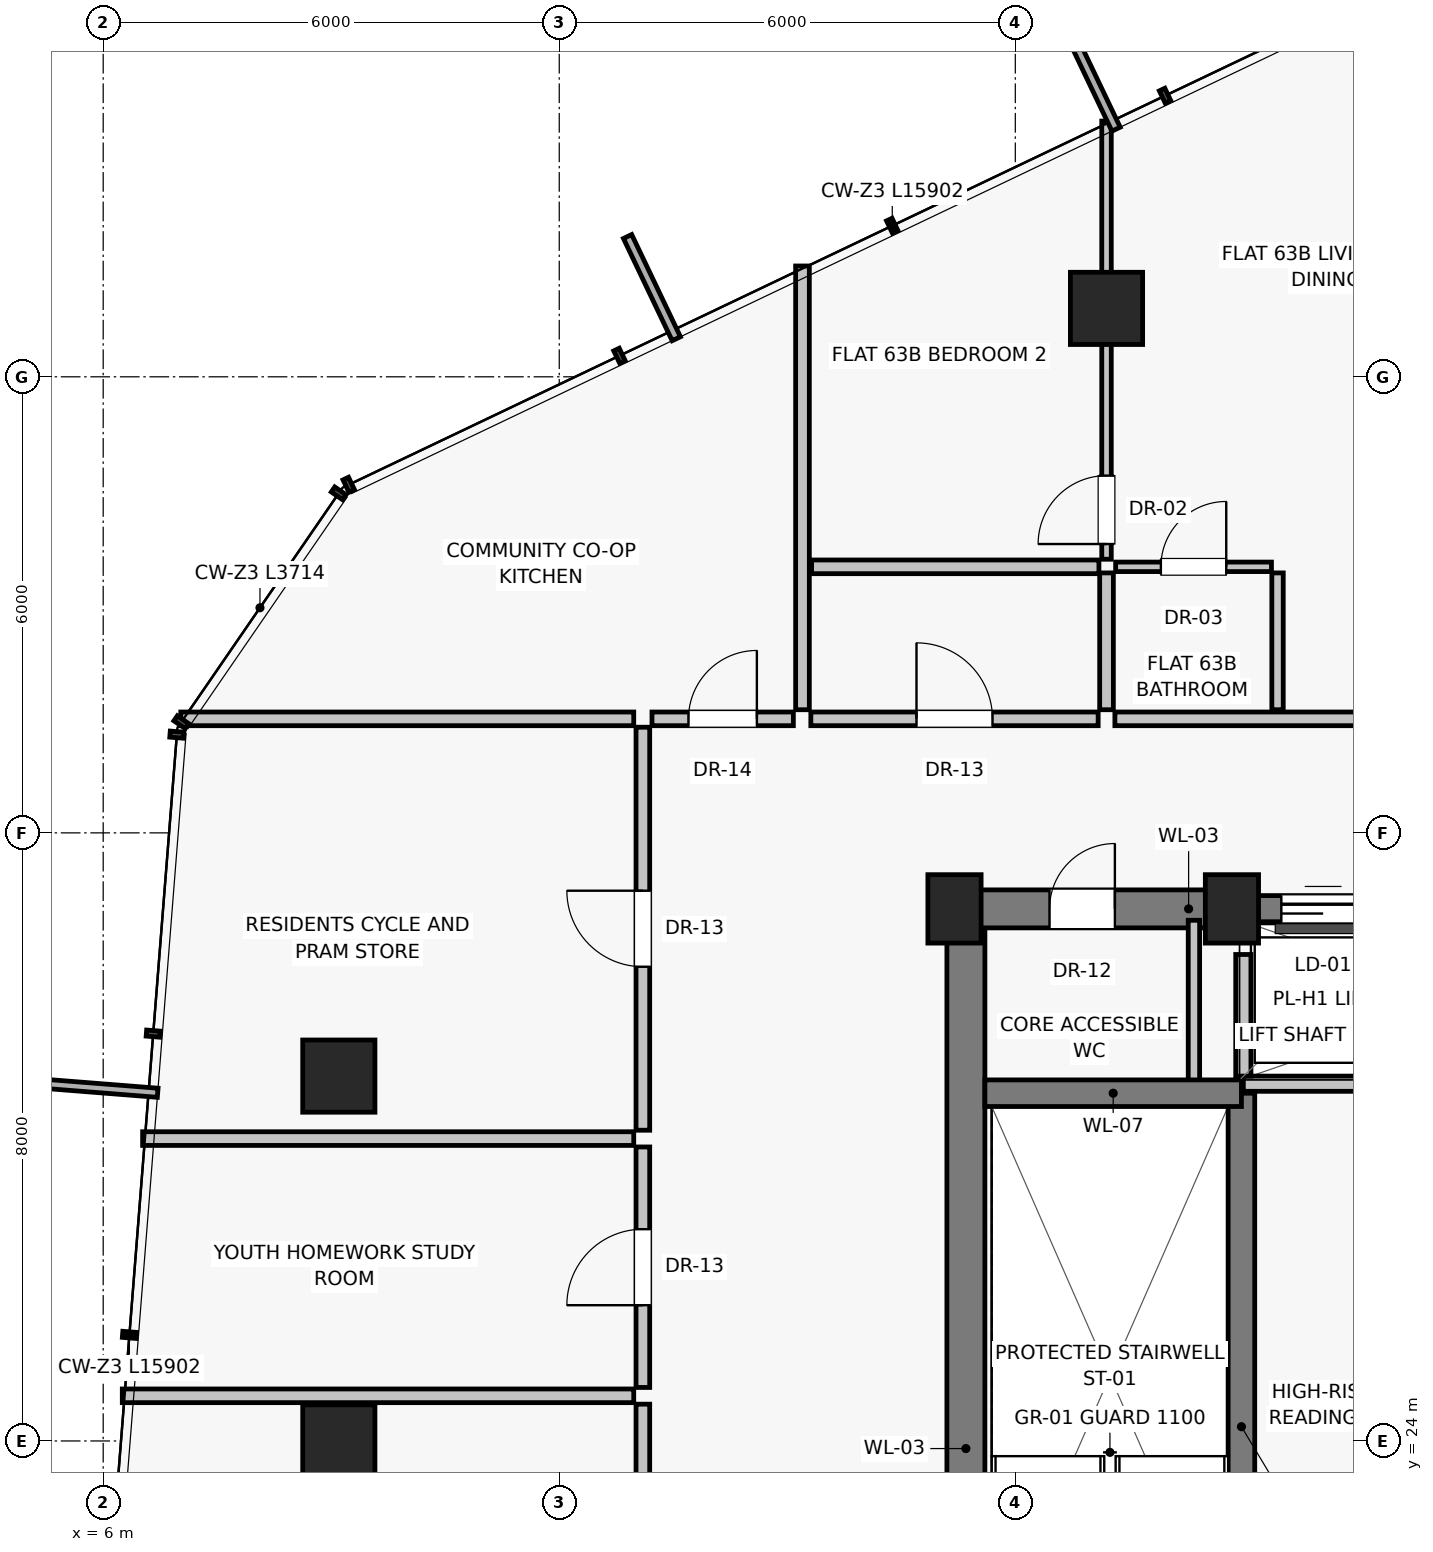
"""IFC4 building model, lengths in metres.
Left out: names, types, materials, properties, quantities, classifications, styles, units other than length and angle.
Written with IfcOpenShell. Run it as: python <this file> out.ifc"""

import sys

from ifc_helpers import new_model, si_unit, direction, frame, frame_2d, origin, origin_2d, place, context, subcontext, project, spatial, rectangle, extrude, source, transform, mapped, element, fill, save


model = new_model("IFC4")
c1 = context("Model", 3, precision=1e-05, world=origin(), true_north=direction((0.0, 1.0)))
c2 = subcontext(c1, "Body", "Model", "MODEL_VIEW")
j1 = project(units=[si_unit("LENGTHUNIT", "METRE"), si_unit("PLANEANGLEUNIT", "RADIAN")], contexts=[c1])
p1 = place(None, origin())
s1 = spatial("IfcSite", under=j1, at=p1, CompositionType="ELEMENT")
p2 = place(p1, origin())
s2 = spatial("IfcBuilding", under=s1, at=p2, CompositionType="ELEMENT")
p3 = place(p2, frame((0.0, 0.0, 222.15)))
s3 = spatial("IfcBuildingStorey", under=s2, at=p3, CompositionType="ELEMENT", Elevation=222.15)
for number, where, z_axis, x_axis in (
    (1, (17.2, 31.0, 0.0), (0.0, 0.0, 1.0), (1.0, 0.0, 0.0)),
    (2, (20.85, 31.0, 0.0), (0.0, 0.0, 1.0), (1.0, 0.0, 0.0)),
):
    element("IfcColumn", number, at=place(p3, frame(where, z_axis=z_axis, x_axis=x_axis)), inside=s3, PredefinedType="PILASTER", context=c2, shape_type="SweptSolid", body=[
        extrude(rectangle(XDim=0.7, YDim=0.9, at=origin_2d()), origin(), (0.0, 0.0, 1.0), 3.25),
    ])
for number, where, z_axis, x_axis in (
    (3, (19.2, 38.9, 0.0), (0.0, 0.0, 1.0), (1.0, 0.0, 0.0)),
    (4, (9.1, 28.8, 0.0), (0.0, 0.0, 1.0), (1.0, 0.0, 0.0)),
    (5, (9.1, 24.0, 0.0), (0.0, 0.0, 1.0), (1.0, 0.0, 0.0)),
):
    element("IfcColumn", number, at=place(p3, frame(where, z_axis=z_axis, x_axis=x_axis)), inside=s3, PredefinedType="COLUMN", context=c2, shape_type="SweptSolid", body=[
        extrude(rectangle(XDim=0.95, YDim=0.95, at=origin_2d()), origin(), (0.0, 0.0, 1.0), 3.25),
    ])
p4 = place(p3, frame((17.35, 16.8, 0.0), z_axis=(0.0, 0.0, 1.0), x_axis=(0.0, 1.0, 0.0)))
e6 = element("IfcWall", 6, at=p4, inside=s3, PredefinedType="SHEAR", context=c2, shape_type="SweptSolid", body=[
    extrude(rectangle(XDim=14.2, YDim=0.5, at=frame_2d((7.1, 0.0))), origin(), (0.0, 0.0, 1.0), 2.93),
])
p5 = place(p3, frame((17.2, 31.0, 0.0), z_axis=(0.0, 0.0, 1.0), x_axis=(1.0, 0.0, 0.0)))
e7 = element("IfcWall", 7, at=p5, inside=s3, PredefinedType="SHEAR", context=c2, shape_type="SweptSolid", body=[
    extrude(rectangle(XDim=3.8, YDim=0.5, at=frame_2d((1.9, 0.0))), origin(), (0.0, 0.0, 1.0), 2.93),
])
p6 = place(p5, frame((1.25, 0.0, 0.0)))
e8 = element("IfcOpeningElement", 8, at=p6, cuts=e7, PredefinedType="OPENING", context=c2, shape_type="SweptSolid", body=[
    extrude(rectangle(XDim=0.86, YDim=2.01, at=frame_2d((0.43, 1.005))), frame((0.0, 0.26, 0.0), z_axis=(0.0, -1.0, 0.0), x_axis=(1.0, 0.0, 0.0)), (0.0, 0.0, 1.0), 0.52),
])
p7 = place(p3, frame((21.0, 31.0, 0.0), z_axis=(0.0, 0.0, 1.0), x_axis=(1.0, 0.0, 0.0)))
e9 = element("IfcWall", 9, at=p7, inside=s3, PredefinedType="SHEAR", context=c2, shape_type="SweptSolid", body=[
    extrude(rectangle(XDim=6.0, YDim=0.35, at=frame_2d((3.0, 0.0))), origin(), (0.0, 0.0, 1.0), 2.93),
])
p8 = place(p7, frame((0.5, 0.0, 0.0)))
e10 = element("IfcOpeningElement", 10, at=p8, cuts=e9, PredefinedType="OPENING", context=c2, shape_type="SweptSolid", body=[
    extrude(rectangle(XDim=1.1, YDim=2.08, at=frame_2d((0.55, 1.04))), frame((0.0, 0.185, 0.0), z_axis=(0.0, -1.0, 0.0), x_axis=(1.0, 0.0, 0.0)), (0.0, 0.0, 1.0), 0.37),
])
p9 = place(p7, frame((2.45, 0.0, 0.0)))
e11 = element("IfcOpeningElement", 11, at=p9, cuts=e9, PredefinedType="OPENING", context=c2, shape_type="SweptSolid", body=[
    extrude(rectangle(XDim=1.1, YDim=2.08, at=frame_2d((0.55, 1.04))), frame((0.0, 0.185, 0.0), z_axis=(0.0, -1.0, 0.0), x_axis=(1.0, 0.0, 0.0)), (0.0, 0.0, 1.0), 0.37),
])
p10 = place(p7, frame((4.4, 0.0, 0.0)))
e12 = element("IfcOpeningElement", 12, at=p10, cuts=e9, PredefinedType="OPENING", context=c2, shape_type="SweptSolid", body=[
    extrude(rectangle(XDim=1.1, YDim=2.08, at=frame_2d((0.55, 1.04))), frame((0.0, 0.185, 0.0), z_axis=(0.0, -1.0, 0.0), x_axis=(1.0, 0.0, 0.0)), (0.0, 0.0, 1.0), 0.37),
])
p11 = place(p3, frame((20.35, 28.65, 0.0), z_axis=(0.0, 0.0, 1.0), x_axis=(0.0, 1.0, 0.0)))
e13 = element("IfcWall", 13, at=p11, inside=s3, PredefinedType="PARTITIONING", context=c2, shape_type="SweptSolid", body=[
    extrude(rectangle(XDim=2.2, YDim=0.15, at=frame_2d((1.1, 0.0))), origin(), (0.0, 0.0, 1.0), 2.93),
])
p12 = place(p3, frame((20.975, 19.8, 0.0), z_axis=(0.0, 0.0, 1.0), x_axis=(0.0, 1.0, 0.0)))
e14 = element("IfcWall", 14, at=p12, inside=s3, PredefinedType="SHEAR", context=c2, shape_type="SweptSolid", body=[
    extrude(rectangle(XDim=8.775, YDim=0.35, at=frame_2d((4.387, 0.0))), origin(), (0.0, 0.0, 1.0), 2.93),
])
p13 = place(p3, frame((17.6, 28.575, 0.0), z_axis=(0.0, 0.0, 1.0), x_axis=(1.0, 0.0, 0.0)))
e15 = element("IfcWall", 15, at=p13, inside=s3, PredefinedType="SHEAR", context=c2, shape_type="SweptSolid", body=[
    extrude(rectangle(XDim=3.375, YDim=0.35, at=frame_2d((1.688, 0.0))), origin(), (0.0, 0.0, 1.0), 2.93),
])
p14 = place(p3, frame((21.0, 28.7, 0.0), z_axis=(0.0, 0.0, 1.0), x_axis=(1.0, 0.0, 0.0)))
e16 = element("IfcWall", 16, at=p14, inside=s3, PredefinedType="SOLIDWALL", context=c2, shape_type="SweptSolid", body=[
    extrude(rectangle(XDim=6.0, YDim=0.2, at=frame_2d((3.0, 0.0))), origin(), (0.0, 0.0, 1.0), 2.93),
])
p15 = place(p3, frame((21.0, 28.8, 0.0), z_axis=(0.0, 0.0, 1.0), x_axis=(0.0, 1.0, 0.0)))
e17 = element("IfcWall", 17, at=p15, inside=s3, PredefinedType="SOLIDWALL", context=c2, shape_type="SweptSolid", body=[
    extrude(rectangle(XDim=1.6, YDim=0.2, at=frame_2d((0.8, 0.0))), origin(), (0.0, 0.0, 1.0), 2.93),
])
p16 = place(p3, frame((15.2, 33.62, 0.0), z_axis=(0.0, 0.0, 1.0), x_axis=(0.0, 1.0, 0.0)))
e18 = element("IfcWall", 18, at=p16, inside=s3, PredefinedType="PARTITIONING", context=c2, shape_type="SweptSolid", body=[
    extrude(rectangle(XDim=5.838, YDim=0.18, at=frame_2d((2.919, 0.0))), origin(), (0.0, 0.0, 1.0), 2.93),
])
p17 = place(p3, frame((15.31, 33.5, 0.0), z_axis=(0.0, 0.0, 1.0), x_axis=(1.0, 0.0, 0.0)))
e19 = element("IfcWall", 19, at=p17, inside=s3, PredefinedType="PARTITIONING", context=c2, shape_type="SweptSolid", body=[
    extrude(rectangle(XDim=3.78, YDim=0.18, at=frame_2d((1.89, 0.0))), origin(), (0.0, 0.0, 1.0), 2.93),
])
p18 = place(p17, frame((1.39, 0.0, 0.0)))
e20 = element("IfcOpeningElement", 20, at=p18, cuts=e19, PredefinedType="OPENING", context=c2, shape_type="SweptSolid", body=[
    extrude(rectangle(XDim=1.0, YDim=2.01, at=frame_2d((0.5, 1.005))), frame((0.0, 0.1, 0.0), z_axis=(0.0, -1.0, 0.0), x_axis=(1.0, 0.0, 0.0)), (0.0, 0.0, 1.0), 0.2),
])
p19 = place(p3, frame((19.31, 33.5, 0.0), z_axis=(0.0, 0.0, 1.0), x_axis=(1.0, 0.0, 0.0)))
e21 = element("IfcWall", 21, at=p19, inside=s3, PredefinedType="PARTITIONING", context=c2, shape_type="SweptSolid", body=[
    extrude(rectangle(XDim=11.78, YDim=0.18, at=frame_2d((5.89, 0.0))), origin(), (0.0, 0.0, 1.0), 2.93),
])
p20 = place(p19, frame((3.98, 0.0, 0.0)))
e22 = element("IfcOpeningElement", 22, at=p20, cuts=e21, PredefinedType="OPENING", context=c2, shape_type="SweptSolid", body=[
    extrude(rectangle(XDim=0.95, YDim=2.02, at=frame_2d((0.475, 1.01))), frame((0.0, 0.1, 0.0), z_axis=(0.0, -1.0, 0.0), x_axis=(1.0, 0.0, 0.0)), (0.0, 0.0, 1.0), 0.2),
])
p21 = place(p3, frame((15.32, 35.5, 0.0), z_axis=(0.0, 0.0, 1.0), x_axis=(1.0, 0.0, 0.0)))
e23 = element("IfcWall", 23, at=p21, inside=s3, PredefinedType="PARTITIONING", context=c2, shape_type="SweptSolid", body=[
    extrude(rectangle(XDim=3.78, YDim=0.18, at=frame_2d((1.89, 0.0))), origin(), (0.0, 0.0, 1.0), 2.93),
])
p22 = place(p3, frame((19.2, 33.62, 0.0), z_axis=(0.0, 0.0, 1.0), x_axis=(0.0, 1.0, 0.0)))
e24 = element("IfcWall", 24, at=p22, inside=s3, PredefinedType="PARTITIONING", context=c2, shape_type="SweptSolid", body=[
    extrude(rectangle(XDim=1.8, YDim=0.18, at=frame_2d((0.9, 0.0))), origin(), (0.0, 0.0, 1.0), 2.93),
])
p23 = place(p3, frame((19.2, 35.6, 0.0), z_axis=(0.0, 0.0, 1.0), x_axis=(0.0, 1.0, 0.0)))
e25 = element("IfcWall", 25, at=p23, inside=s3, PredefinedType="PARTITIONING", context=c2, shape_type="SweptSolid", body=[
    extrude(rectangle(XDim=5.764, YDim=0.125, at=frame_2d((2.882, 0.0))), origin(), (0.0, 0.0, 1.0), 2.384),
])
p24 = place(p23, frame((0.2, 0.0, 0.0)))
e26 = element("IfcOpeningElement", 26, at=p24, cuts=e25, PredefinedType="OPENING", context=c2, shape_type="SweptSolid", body=[
    extrude(rectangle(XDim=0.9, YDim=2.01, at=frame_2d((0.45, 1.005))), frame((0.0, 0.073, 0.0), z_axis=(0.0, -1.0, 0.0), x_axis=(1.0, 0.0, 0.0)), (0.0, 0.0, 1.0), 0.145),
])
p25 = place(p3, frame((21.45, 33.62, 0.0), z_axis=(0.0, 0.0, 1.0), x_axis=(0.0, 1.0, 0.0)))
e27 = element("IfcWall", 27, at=p25, inside=s3, PredefinedType="PARTITIONING", context=c2, shape_type="SweptSolid", body=[
    extrude(rectangle(XDim=1.8, YDim=0.15, at=frame_2d((0.9, 0.0))), origin(), (0.0, 0.0, 1.0), 2.93),
])
p26 = place(p3, frame((19.32, 35.5, 0.0), z_axis=(0.0, 0.0, 1.0), x_axis=(1.0, 0.0, 0.0)))
e28 = element("IfcWall", 28, at=p26, inside=s3, PredefinedType="PARTITIONING", context=c2, shape_type="SweptSolid", body=[
    extrude(rectangle(XDim=2.05, YDim=0.125, at=frame_2d((1.025, 0.0))), origin(), (0.0, 0.0, 1.0), 2.577),
])
p27 = place(p26, frame((0.595, 0.0, 0.0)))
e29 = element("IfcOpeningElement", 29, at=p27, cuts=e28, PredefinedType="OPENING", context=c2, shape_type="SweptSolid", body=[
    extrude(rectangle(XDim=0.86, YDim=2.01, at=frame_2d((0.43, 1.005))), frame((0.0, 0.073, 0.0), z_axis=(0.0, -1.0, 0.0), x_axis=(1.0, 0.0, 0.0)), (0.0, 0.0, 1.0), 0.145),
])
p28 = place(p3, frame((12.98, 33.5, 0.0), z_axis=(0.0, 0.0, 1.0), x_axis=(-1.0, 0.0, 0.0)))
e30 = element("IfcWall", 30, at=p28, inside=s3, PredefinedType="PARTITIONING", context=c2, shape_type="SweptSolid", body=[
    extrude(rectangle(XDim=5.959, YDim=0.18, at=frame_2d((2.979, 0.0))), origin(), (0.0, 0.0, 1.0), 2.93),
])
p29 = place(p3, frame((13.1, 18.322, 0.0), z_axis=(0.0, 0.0, 1.0), x_axis=(0.0, 1.0, 0.0)))
e31 = element("IfcWall", 31, at=p29, inside=s3, PredefinedType="PARTITIONING", context=c2, shape_type="SweptSolid", body=[
    extrude(rectangle(XDim=6.162, YDim=0.18, at=frame_2d((3.081, 0.0))), origin(), (0.0, 0.0, 1.0), 2.577),
])
p30 = place(p29, frame((2.581, 0.0, 0.0)))
e32 = element("IfcOpeningElement", 32, at=p30, cuts=e31, PredefinedType="OPENING", context=c2, shape_type="SweptSolid", body=[
    extrude(rectangle(XDim=1.0, YDim=2.01, at=frame_2d((0.5, 1.005))), frame((0.0, 0.1, 0.0), z_axis=(0.0, -1.0, 0.0), x_axis=(1.0, 0.0, 0.0)), (0.0, 0.0, 1.0), 0.2),
])
p31 = place(p3, frame((12.98, 24.594, 0.0), z_axis=(0.0, 0.0, 1.0), x_axis=(-1.0, 0.0, 0.0)))
e33 = element("IfcWall", 33, at=p31, inside=s3, PredefinedType="PARTITIONING", context=c2, shape_type="SweptSolid", body=[
    extrude(rectangle(XDim=6.729, YDim=0.18, at=frame_2d((3.364, 0.0))), origin(), (0.0, 0.0, 1.0), 2.93),
])
p32 = place(p3, frame((13.1, 24.704, 0.0), z_axis=(0.0, 0.0, 1.0), x_axis=(0.0, 1.0, 0.0)))
e34 = element("IfcWall", 34, at=p32, inside=s3, PredefinedType="PARTITIONING", context=c2, shape_type="SweptSolid", body=[
    extrude(rectangle(XDim=3.164, YDim=0.18, at=frame_2d((1.582, 0.0))), origin(), (0.0, 0.0, 1.0), 2.577),
])
p33 = place(p32, frame((1.082, 0.0, 0.0)))
e35 = element("IfcOpeningElement", 35, at=p33, cuts=e34, PredefinedType="OPENING", context=c2, shape_type="SweptSolid", body=[
    extrude(rectangle(XDim=1.0, YDim=2.01, at=frame_2d((0.5, 1.005))), frame((0.0, 0.1, 0.0), z_axis=(0.0, -1.0, 0.0), x_axis=(1.0, 0.0, 0.0)), (0.0, 0.0, 1.0), 0.2),
])
p34 = place(p3, frame((13.1, 28.088, 0.0), z_axis=(0.0, 0.0, 1.0), x_axis=(0.0, 1.0, 0.0)))
e36 = element("IfcWall", 36, at=p34, inside=s3, PredefinedType="PARTITIONING", context=c2, shape_type="SweptSolid", body=[
    extrude(rectangle(XDim=5.302, YDim=0.18, at=frame_2d((2.651, 0.0))), origin(), (0.0, 0.0, 1.0), 2.577),
])
p35 = place(p34, frame((2.151, 0.0, 0.0)))
e37 = element("IfcOpeningElement", 37, at=p35, cuts=e36, PredefinedType="OPENING", context=c2, shape_type="SweptSolid", body=[
    extrude(rectangle(XDim=1.0, YDim=2.01, at=frame_2d((0.5, 1.005))), frame((0.0, 0.1, 0.0), z_axis=(0.0, -1.0, 0.0), x_axis=(1.0, 0.0, 0.0)), (0.0, 0.0, 1.0), 0.2),
])
p36 = place(p3, frame((12.98, 27.978, 0.0), z_axis=(0.0, 0.0, 1.0), x_axis=(-1.0, 0.0, 0.0)))
e38 = element("IfcWall", 38, at=p36, inside=s3, PredefinedType="PARTITIONING", context=c2, shape_type="SweptSolid", body=[
    extrude(rectangle(XDim=6.461, YDim=0.18, at=frame_2d((3.23, 0.0))), origin(), (0.0, 0.0, 1.0), 2.93),
])
p37 = place(p3, frame((13.22, 33.5, 0.0), z_axis=(0.0, 0.0, 1.0), x_axis=(1.0, 0.0, 0.0)))
e39 = element("IfcWall", 39, at=p37, inside=s3, PredefinedType="PARTITIONING", context=c2, shape_type="SweptSolid", body=[
    extrude(rectangle(XDim=1.86, YDim=0.18, at=frame_2d((0.93, 0.0))), origin(), (0.0, 0.0, 1.0), 2.93),
])
p38 = place(p37, frame((0.48, 0.0, 0.0)))
e40 = element("IfcOpeningElement", 40, at=p38, cuts=e39, PredefinedType="OPENING", context=c2, shape_type="SweptSolid", body=[
    extrude(rectangle(XDim=0.9, YDim=2.01, at=frame_2d((0.45, 1.005))), frame((0.0, 0.1, 0.0), z_axis=(0.0, -1.0, 0.0), x_axis=(1.0, 0.0, 0.0)), (0.0, 0.0, 1.0), 0.2),
])
m1 = source(origin(), c2, "Body", "SweptSolid", [
    extrude(rectangle(XDim=0.86, YDim=2.01, at=frame_2d((0.43, 1.005))), frame((0.0, 0.025, 0.0), z_axis=(0.0, -1.0, 0.0), x_axis=(1.0, 0.0, 0.0)), (0.0, 0.0, 1.0), 0.05),
])
p39 = place(p6, origin())
e41 = element("IfcDoor", 41, at=p39, inside=s3, OperationType="SINGLE_SWING_RIGHT", PredefinedType="DOOR", context=c2, shape_type="MappedRepresentation", body=[
    mapped(m1, transform((0.0, 0.0, 0.0), scale=1.0)),
])
fill(e8, e41)
m2 = source(origin(), c2, "Body", "SweptSolid", [
    extrude(rectangle(XDim=1.1, YDim=2.08, at=frame_2d((0.55, 1.04))), frame((0.0, 0.025, 0.0), z_axis=(0.0, -1.0, 0.0), x_axis=(1.0, 0.0, 0.0)), (0.0, 0.0, 1.0), 0.05),
])
p40 = place(p8, origin())
e42 = element("IfcDoor", 42, at=p40, inside=s3, OperationType="SLIDING_TO_LEFT", PredefinedType="DOOR", context=c2, shape_type="MappedRepresentation", body=[
    mapped(m2, transform((0.0, 0.0, 0.0), scale=1.0)),
])
fill(e10, e42)
m3 = source(origin(), c2, "Body", "SweptSolid", [
    extrude(rectangle(XDim=1.0, YDim=2.01, at=frame_2d((0.5, 1.005))), frame((0.0, 0.025, 0.0), z_axis=(0.0, -1.0, 0.0), x_axis=(1.0, 0.0, 0.0)), (0.0, 0.0, 1.0), 0.05),
])
p41 = place(p18, origin())
e43 = element("IfcDoor", 43, at=p41, inside=s3, OperationType="SINGLE_SWING_LEFT", PredefinedType="DOOR", context=c2, shape_type="MappedRepresentation", body=[
    mapped(m3, transform((0.0, 0.0, 0.0), scale=1.0)),
])
fill(e20, e43)
m4 = source(origin(), c2, "Body", "SweptSolid", [
    extrude(rectangle(XDim=0.9, YDim=2.01, at=frame_2d((0.45, 1.005))), frame((0.0, 0.025, 0.0), z_axis=(0.0, -1.0, 0.0), x_axis=(1.0, 0.0, 0.0)), (0.0, 0.0, 1.0), 0.05),
])
p42 = place(p24, origin())
e44 = element("IfcDoor", 44, at=p42, inside=s3, OperationType="SINGLE_SWING_LEFT", PredefinedType="DOOR", context=c2, shape_type="MappedRepresentation", body=[
    mapped(m4, transform((0.0, 0.0, 0.0), scale=1.0)),
])
fill(e26, e44)
p43 = place(p27, origin())
e45 = element("IfcDoor", 45, at=p43, inside=s3, OperationType="SINGLE_SWING_RIGHT", PredefinedType="DOOR", context=c2, shape_type="MappedRepresentation", body=[
    mapped(m1, transform((0.0, 0.0, 0.0), scale=1.0)),
])
fill(e29, e45)
p44 = place(p33, origin())
e46 = element("IfcDoor", 46, at=p44, inside=s3, OperationType="SINGLE_SWING_LEFT", PredefinedType="DOOR", context=c2, shape_type="MappedRepresentation", body=[
    mapped(m3, transform((0.0, 0.0, 0.0), scale=1.0)),
])
fill(e35, e46)
p45 = place(p35, origin())
e47 = element("IfcDoor", 47, at=p45, inside=s3, OperationType="SINGLE_SWING_RIGHT", PredefinedType="DOOR", context=c2, shape_type="MappedRepresentation", body=[
    mapped(m3, transform((0.0, 0.0, 0.0), scale=1.0)),
])
fill(e37, e47)
p46 = place(p38, origin())
e48 = element("IfcDoor", 48, at=p46, inside=s3, OperationType="SINGLE_SWING_RIGHT", PredefinedType="DOOR", context=c2, shape_type="MappedRepresentation", body=[
    mapped(m4, transform((0.0, 0.0, 0.0), scale=1.0)),
])
fill(e40, e48)
save(model, sys.argv[1])
